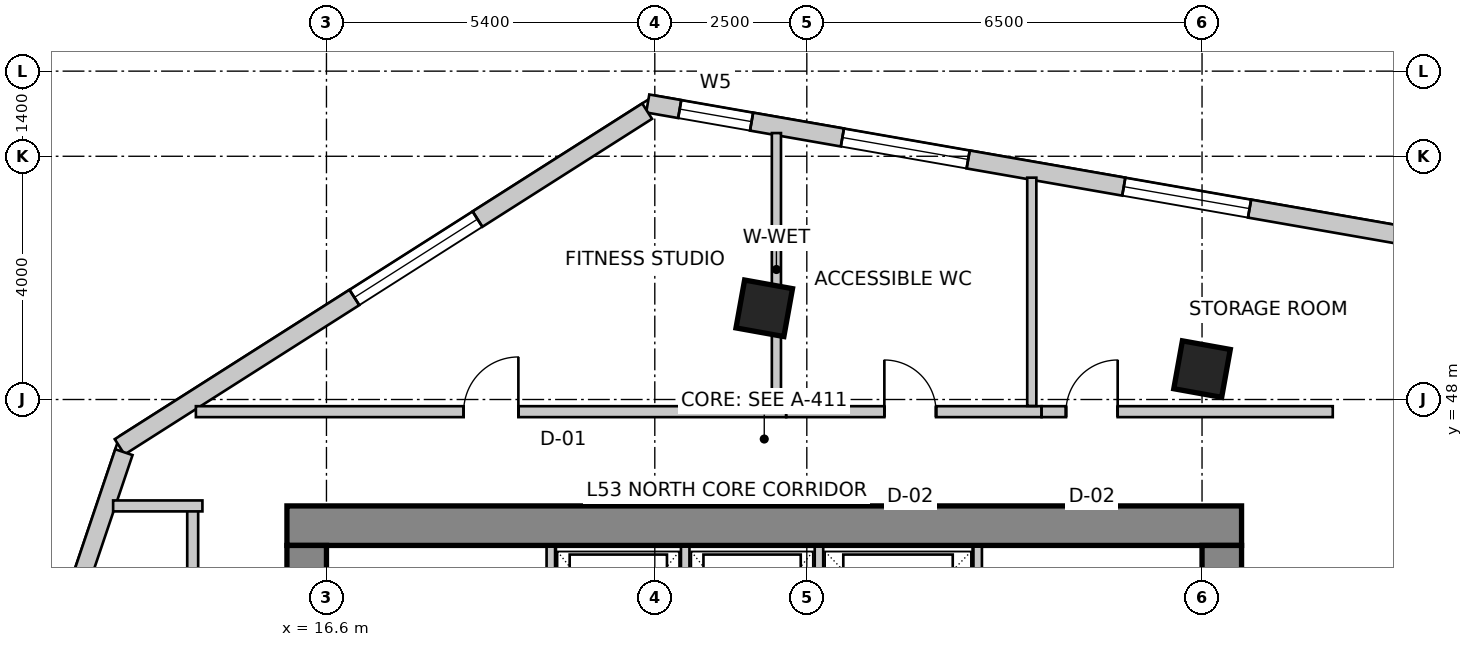
"""IFC4 building model, lengths in metres.
Left out: names, types, materials, properties, quantities, classifications, styles, units other than length and angle.
Written with IfcOpenShell. Run it as: python <this file> out.ifc"""

import sys

from ifc_helpers import new_model, si_unit, direction, frame, frame_2d, origin, origin_2d, place, context, subcontext, project, spatial, rectangle, extrude, source, transform, mapped, element, fill, save


model = new_model("IFC4")
c1 = context("Model", 3, precision=1e-05, world=origin(), true_north=direction((0.0, 1.0)))
c2 = subcontext(c1, "Body", "Model", "MODEL_VIEW")
j1 = project(units=[si_unit("LENGTHUNIT", "METRE"), si_unit("PLANEANGLEUNIT", "RADIAN")], contexts=[c1])
p1 = place(None, origin())
s1 = spatial("IfcSite", under=j1, at=p1, CompositionType="ELEMENT")
p2 = place(p1, origin())
s2 = spatial("IfcBuilding", under=s1, at=p2, CompositionType="ELEMENT")
p3 = place(p2, frame((0.0, 0.0, 211.4)))
s3 = spatial("IfcBuildingStorey", under=s2, at=p3, CompositionType="ELEMENT", Elevation=211.4)
p4 = place(p3, frame((15.95, 45.925, 0.0), z_axis=(0.0, 0.0, 1.0), x_axis=(1.0, 0.0, 0.0)))
e1 = element("IfcWall", 1, at=p4, inside=s3, PredefinedType="SHEAR", context=c2, shape_type="SweptSolid", body=[
    extrude(rectangle(XDim=15.7, YDim=0.65, at=frame_2d((7.85, 0.0))), origin(), (0.0, 0.0, 1.0), 3.5),
])
p5 = place(p3, frame((16.275, 34.2, 0.0), z_axis=(0.0, 0.0, 1.0), x_axis=(0.0, 1.0, 0.0)))
e2 = element("IfcWall", 2, at=p5, inside=s3, PredefinedType="SHEAR", context=c2, shape_type="SweptSolid", body=[
    extrude(rectangle(XDim=11.4, YDim=0.65, at=frame_2d((5.7, 0.0))), origin(), (0.0, 0.0, 1.0), 3.5),
])
m1 = source(origin(), c2, "Body", "SweptSolid", [
    extrude(rectangle(XDim=1.1, YDim=2.15, at=frame_2d((0.55, 1.075))), frame((0.0, 0.335, 0.0), z_axis=(0.0, -1.0, 0.0), x_axis=(1.0, 0.0, 0.0)), (0.0, 0.0, 1.0), 0.67),
])
p6 = place(p5, frame((7.15, 0.0, 0.0)))
e3 = element("IfcOpeningElement", 3, at=p6, cuts=e2, PredefinedType="OPENING", context=c2, shape_type="MappedRepresentation", body=[
    mapped(m1, transform((0.0, 0.0, 0.0), scale=1.0)),
])
p7 = place(p3, frame((31.325, 34.2, 0.0), z_axis=(0.0, 0.0, 1.0), x_axis=(0.0, 1.0, 0.0)))
e4 = element("IfcWall", 4, at=p7, inside=s3, PredefinedType="SHEAR", context=c2, shape_type="SweptSolid", body=[
    extrude(rectangle(XDim=11.4, YDim=0.65, at=frame_2d((5.7, 0.0))), origin(), (0.0, 0.0, 1.0), 3.5),
])
p8 = place(p7, frame((7.35, 0.0, 0.0)))
e5 = element("IfcOpeningElement", 5, at=p8, cuts=e4, PredefinedType="OPENING", context=c2, shape_type="MappedRepresentation", body=[
    mapped(m1, transform((0.0, 0.0, 0.0), scale=1.0)),
])
m2 = source(origin(), c2, "Body", "SweptSolid", [
    extrude(rectangle(XDim=0.8, YDim=0.8, at=origin_2d()), origin(), (0.0, 0.0, 1.0), 3.5),
])
for number, where, z_axis, x_axis in (
    (6, (23.8, 49.5, 0.0), (0.0, 0.0, 1.0), (0.984, -0.177, 0.0)),
    (7, (31.0, 48.5, 0.0), (0.0, 0.0, 1.0), (0.984, -0.177, 0.0)),
):
    element("IfcColumn", number, at=place(p3, frame(where, z_axis=z_axis, x_axis=x_axis)), inside=s3, PredefinedType="COLUMN", context=c2, shape_type="MappedRepresentation", body=[
        mapped(m2, transform((0.0, 0.0, 0.0), scale=1.0)),
    ])
p9 = place(p3, frame((43.561, 49.081, 0.0), z_axis=(0.0, 0.0, 1.0), x_axis=(-0.985083967494, 0.17207433564, 0.0)))
e8 = element("IfcWall", 8, at=p9, inside=s3, PredefinedType="SOLIDWALL", context=c2, shape_type="SweptSolid", body=[
    extrude(rectangle(XDim=22.006, YDim=0.3, at=frame_2d((11.003, 0.0))), origin(), (0.0, 0.0, 1.0), 3.25),
])
m3 = source(origin(), c2, "Body", "SweptSolid", [
    extrude(rectangle(XDim=2.1, YDim=2.0, at=frame_2d((1.05, 1.0))), frame((0.0, 0.16, 0.0), z_axis=(0.0, -1.0, 0.0), x_axis=(1.0, 0.0, 0.0)), (0.0, 0.0, 1.0), 0.32),
])
p10 = place(p9, frame((2.573, 0.0, 0.85)))
e9 = element("IfcOpeningElement", 9, at=p10, cuts=e8, PredefinedType="OPENING", context=c2, shape_type="MappedRepresentation", body=[
    mapped(m3, transform((0.0, 0.0, 0.0), scale=1.0)),
])
m4 = source(origin(), c2, "Body", "SweptSolid", [
    extrude(rectangle(XDim=2.4, YDim=2.2, at=frame_2d((1.2, 1.1))), frame((0.0, 0.16, 0.0), z_axis=(0.0, -1.0, 0.0), x_axis=(1.0, 0.0, 0.0)), (0.0, 0.0, 1.0), 0.32),
])
p11 = place(p9, frame((7.116, 0.0, 0.85)))
e10 = element("IfcOpeningElement", 10, at=p11, cuts=e8, PredefinedType="OPENING", context=c2, shape_type="MappedRepresentation", body=[
    mapped(m4, transform((0.0, 0.0, 0.0), scale=1.0)),
])
p12 = place(p9, frame((11.958, 0.0, 0.85)))
e11 = element("IfcOpeningElement", 11, at=p12, cuts=e8, PredefinedType="OPENING", context=c2, shape_type="MappedRepresentation", body=[
    mapped(m3, transform((0.0, 0.0, 0.0), scale=1.0)),
])
p13 = place(p9, frame((16.656, 0.0, 0.85)))
e12 = element("IfcOpeningElement", 12, at=p13, cuts=e8, PredefinedType="OPENING", context=c2, shape_type="MappedRepresentation", body=[
    mapped(m3, transform((0.0, 0.0, 0.0), scale=1.0)),
])
m5 = source(origin(), c2, "Body", "SweptSolid", [
    extrude(rectangle(XDim=1.2, YDim=1.6, at=frame_2d((0.6, 0.8))), frame((0.0, 0.16, 0.0), z_axis=(0.0, -1.0, 0.0), x_axis=(1.0, 0.0, 0.0)), (0.0, 0.0, 1.0), 0.32),
])
p14 = place(p9, frame((20.272, 0.0, 0.85)))
e13 = element("IfcOpeningElement", 13, at=p14, cuts=e8, PredefinedType="OPENING", context=c2, shape_type="MappedRepresentation", body=[
    mapped(m5, transform((0.0, 0.0, 0.0), scale=1.0)),
])
p15 = place(p3, frame((21.874, 52.742, 0.0), z_axis=(0.0, 0.0, 1.0), x_axis=(-0.84365659959, -0.536883173482, 0.0)))
e14 = element("IfcWall", 14, at=p15, inside=s3, PredefinedType="SOLIDWALL", context=c2, shape_type="SweptSolid", body=[
    extrude(rectangle(XDim=10.283, YDim=0.3, at=frame_2d((5.142, 0.0))), origin(), (0.0, 0.0, 1.0), 3.25),
])
p16 = place(p15, frame((3.307, 0.0, 0.85)))
e15 = element("IfcOpeningElement", 15, at=p16, cuts=e14, PredefinedType="OPENING", context=c2, shape_type="MappedRepresentation", body=[
    mapped(m4, transform((0.0, 0.0, 0.0), scale=1.0)),
])
p17 = place(p3, frame((13.269, 47.134, 0.0), z_axis=(0.0, 0.0, 1.0), x_axis=(-0.319920776449, -0.947444297464, 0.0)))
e16 = element("IfcWall", 16, at=p17, inside=s3, PredefinedType="SOLIDWALL", context=c2, shape_type="SweptSolid", body=[
    extrude(rectangle(XDim=16.133, YDim=0.3, at=frame_2d((8.067, 0.0))), origin(), (0.0, 0.0, 1.0), 3.25),
])
p18 = place(p17, frame((2.513, 0.0, 0.85)))
e17 = element("IfcOpeningElement", 17, at=p18, cuts=e16, PredefinedType="OPENING", context=c2, shape_type="MappedRepresentation", body=[
    mapped(m3, transform((0.0, 0.0, 0.0), scale=1.0)),
])
p19 = place(p17, frame((7.26, 0.0, 0.85)))
e18 = element("IfcOpeningElement", 18, at=p19, cuts=e16, PredefinedType="OPENING", context=c2, shape_type="MappedRepresentation", body=[
    mapped(m4, transform((0.0, 0.0, 0.0), scale=1.0)),
])
p20 = place(p17, frame((12.307, 0.0, 0.85)))
e19 = element("IfcOpeningElement", 19, at=p20, cuts=e16, PredefinedType="OPENING", context=c2, shape_type="MappedRepresentation", body=[
    mapped(m3, transform((0.0, 0.0, 0.0), scale=1.0)),
])
for number, where, z_axis, x_axis in (
    (20, (20.29, 43.28, 0.0), (0.0, 0.0, 1.0), (0.0, 1.0, 0.0)),
    (21, (27.31, 43.28, 0.0), (0.0, 0.0, 1.0), (0.0, 1.0, 0.0)),
):
    element("IfcWall", number, at=place(p3, frame(where, z_axis=z_axis, x_axis=x_axis)), inside=s3, PredefinedType="SOLIDWALL", context=c2, shape_type="SweptSolid", body=[
        extrude(rectangle(XDim=2.3, YDim=0.14, at=frame_2d((1.15, 0.0))), origin(), (0.0, 0.0, 1.0), 3.25),
    ])
for number, where, z_axis, x_axis in (
    (22, (22.5, 43.02, 0.0), (0.0, 0.0, 1.0), (0.0, 1.0, 0.0)),
    (23, (24.7, 43.02, 0.0), (0.0, 0.0, 1.0), (0.0, 1.0, 0.0)),
):
    element("IfcWall", number, at=place(p3, frame(where, z_axis=z_axis, x_axis=x_axis)), inside=s3, PredefinedType="SOLIDWALL", context=c2, shape_type="SweptSolid", body=[
        extrude(rectangle(XDim=2.56, YDim=0.14, at=frame_2d((1.28, 0.0))), origin(), (0.0, 0.0, 1.0), 3.25),
    ])
p21 = place(p3, frame((14.4, 33.644, 0.0), z_axis=(0.0, 0.0, 1.0), x_axis=(0.0, 1.0, 0.0)))
e24 = element("IfcWall", 24, at=p21, inside=s3, PredefinedType="PARTITIONING", context=c2, shape_type="SweptSolid", body=[
    extrude(rectangle(XDim=12.606, YDim=0.18, at=frame_2d((6.303, 0.0))), origin(), (0.0, 0.0, 1.0), 3.25),
])
m6 = source(origin(), c2, "Body", "SweptSolid", [
    extrude(rectangle(XDim=0.9, YDim=2.15, at=frame_2d((0.45, 1.075))), frame((0.0, 0.1, 0.0), z_axis=(0.0, -1.0, 0.0), x_axis=(1.0, 0.0, 0.0)), (0.0, 0.0, 1.0), 0.2),
])
p22 = place(p21, frame((4.399, 0.0, 0.0)))
e25 = element("IfcOpeningElement", 25, at=p22, cuts=e24, PredefinedType="OPENING", context=c2, shape_type="MappedRepresentation", body=[
    mapped(m6, transform((0.0, 0.0, 0.0), scale=1.0)),
])
p23 = place(p3, frame((14.56, 46.25, 0.0), z_axis=(0.0, 0.0, 1.0), x_axis=(-1.0, 0.0, 0.0)))
e26 = element("IfcWall", 26, at=p23, inside=s3, PredefinedType="PARTITIONING", context=c2, shape_type="SweptSolid", body=[
    extrude(rectangle(XDim=1.469, YDim=0.18, at=frame_2d((0.734, 0.0))), origin(), (0.0, 0.0, 1.0), 3.25),
])
p24 = place(p3, frame((14.453, 47.8, 0.0), z_axis=(0.0, 0.0, 1.0), x_axis=(1.0, 0.0, 0.0)))
e27 = element("IfcWall", 27, at=p24, inside=s3, PredefinedType="PARTITIONING", context=c2, shape_type="SweptSolid", body=[
    extrude(rectangle(XDim=9.707, YDim=0.18, at=frame_2d((4.854, 0.0))), origin(), (0.0, 0.0, 1.0), 2.934),
])
p25 = place(p24, frame((4.404, 0.0, 0.0)))
e28 = element("IfcOpeningElement", 28, at=p25, cuts=e27, PredefinedType="OPENING", context=c2, shape_type="MappedRepresentation", body=[
    mapped(m6, transform((0.0, 0.0, 0.0), scale=1.0)),
])
p26 = place(p3, frame((24.162, 47.8, 0.0), z_axis=(0.0, 0.0, 1.0), x_axis=(1.0, 0.0, 0.0)))
e29 = element("IfcWall", 29, at=p26, inside=s3, PredefinedType="PARTITIONING", context=c2, shape_type="SweptSolid", body=[
    extrude(rectangle(XDim=4.198, YDim=0.18, at=frame_2d((2.099, 0.0))), origin(), (0.0, 0.0, 1.0), 3.25),
])
m7 = source(origin(), c2, "Body", "SweptSolid", [
    extrude(rectangle(XDim=0.85, YDim=2.15, at=frame_2d((0.425, 1.075))), frame((0.0, 0.1, 0.0), z_axis=(0.0, -1.0, 0.0), x_axis=(1.0, 0.0, 0.0)), (0.0, 0.0, 1.0), 0.2),
])
p27 = place(p26, frame((1.613, 0.0, 0.0)))
e30 = element("IfcOpeningElement", 30, at=p27, cuts=e29, PredefinedType="OPENING", context=c2, shape_type="MappedRepresentation", body=[
    mapped(m7, transform((0.0, 0.0, 0.0), scale=1.0)),
])
p28 = place(p3, frame((28.362, 47.8, 0.0), z_axis=(0.0, 0.0, 1.0), x_axis=(1.0, 0.0, 0.0)))
e31 = element("IfcWall", 31, at=p28, inside=s3, PredefinedType="PARTITIONING", context=c2, shape_type="SweptSolid", body=[
    extrude(rectangle(XDim=4.788, YDim=0.18, at=frame_2d((2.394, 0.0))), origin(), (0.0, 0.0, 1.0), 2.822),
])
p29 = place(p28, frame((0.401, 0.0, 0.0)))
e32 = element("IfcOpeningElement", 32, at=p29, cuts=e31, PredefinedType="OPENING", context=c2, shape_type="MappedRepresentation", body=[
    mapped(m7, transform((0.0, 0.0, 0.0), scale=1.0)),
])
p30 = place(p3, frame((24.0, 52.382, 0.0), z_axis=(0.0, 0.0, 1.0), x_axis=(0.0, -1.0, 0.0)))
e33 = element("IfcWall", 33, at=p30, inside=s3, PredefinedType="PARTITIONING", context=c2, shape_type="SweptSolid", body=[
    extrude(rectangle(XDim=4.488, YDim=0.15, at=frame_2d((2.244, 0.0))), origin(), (0.0, 0.0, 1.0), 2.542),
])
p31 = place(p3, frame((28.2, 51.648, 0.0), z_axis=(0.0, 0.0, 1.0), x_axis=(0.0, -1.0, 0.0)))
e34 = element("IfcWall", 34, at=p31, inside=s3, PredefinedType="PARTITIONING", context=c2, shape_type="SweptSolid", body=[
    extrude(rectangle(XDim=3.754, YDim=0.15, at=frame_2d((1.877, 0.0))), origin(), (0.0, 0.0, 1.0), 2.542),
])
m8 = source(origin(), c2, "Body", "SweptSolid", [
    extrude(rectangle(XDim=2.1, YDim=2.0, at=frame_2d((1.05, 1.0))), frame((0.0, -0.015, 0.0), z_axis=(0.0, -1.0, 0.0), x_axis=(1.0, 0.0, 0.0)), (0.0, 0.0, 1.0), 0.06),
])
p32 = place(p12, origin())
e35 = element("IfcWindow", 35, at=p32, inside=s3, PartitioningType="SINGLE_PANEL", PredefinedType="WINDOW", context=c2, shape_type="MappedRepresentation", body=[
    mapped(m8, transform((0.0, 0.0, 0.0), scale=1.0)),
])
fill(e11, e35)
p33 = place(p13, origin())
e36 = element("IfcWindow", 36, at=p33, inside=s3, PartitioningType="SINGLE_PANEL", PredefinedType="WINDOW", context=c2, shape_type="MappedRepresentation", body=[
    mapped(m8, transform((0.0, 0.0, 0.0), scale=1.0)),
])
fill(e12, e36)
m9 = source(origin(), c2, "Body", "SweptSolid", [
    extrude(rectangle(XDim=1.2, YDim=1.6, at=frame_2d((0.6, 0.8))), frame((0.0, -0.015, 0.0), z_axis=(0.0, -1.0, 0.0), x_axis=(1.0, 0.0, 0.0)), (0.0, 0.0, 1.0), 0.06),
])
p34 = place(p14, origin())
e37 = element("IfcWindow", 37, at=p34, inside=s3, PartitioningType="SINGLE_PANEL", PredefinedType="WINDOW", context=c2, shape_type="MappedRepresentation", body=[
    mapped(m9, transform((0.0, 0.0, 0.0), scale=1.0)),
])
fill(e13, e37)
m10 = source(origin(), c2, "Body", "SweptSolid", [
    extrude(rectangle(XDim=2.4, YDim=2.2, at=frame_2d((1.2, 1.1))), frame((0.0, -0.015, 0.0), z_axis=(0.0, -1.0, 0.0), x_axis=(1.0, 0.0, 0.0)), (0.0, 0.0, 1.0), 0.06),
])
p35 = place(p16, origin())
e38 = element("IfcWindow", 38, at=p35, inside=s3, PartitioningType="SINGLE_PANEL", PredefinedType="WINDOW", context=c2, shape_type="MappedRepresentation", body=[
    mapped(m10, transform((0.0, 0.0, 0.0), scale=1.0)),
])
fill(e15, e38)
m11 = source(origin(), c2, "Body", "SweptSolid", [
    extrude(rectangle(XDim=0.9, YDim=2.15, at=frame_2d((0.45, 1.075))), frame((0.0, 0.025, 0.0), z_axis=(0.0, -1.0, 0.0), x_axis=(1.0, 0.0, 0.0)), (0.0, 0.0, 1.0), 0.05),
])
p36 = place(p25, origin())
e39 = element("IfcDoor", 39, at=p36, inside=s3, OperationType="SINGLE_SWING_RIGHT", PredefinedType="DOOR", context=c2, shape_type="MappedRepresentation", body=[
    mapped(m11, transform((0.0, 0.0, 0.0), scale=1.0)),
])
fill(e28, e39)
m12 = source(origin(), c2, "Body", "SweptSolid", [
    extrude(rectangle(XDim=0.85, YDim=2.15, at=frame_2d((0.425, 1.075))), frame((0.0, 0.025, 0.0), z_axis=(0.0, -1.0, 0.0), x_axis=(1.0, 0.0, 0.0)), (0.0, 0.0, 1.0), 0.05),
])
p37 = place(p27, origin())
e40 = element("IfcDoor", 40, at=p37, inside=s3, OperationType="SINGLE_SWING_LEFT", PredefinedType="DOOR", context=c2, shape_type="MappedRepresentation", body=[
    mapped(m12, transform((0.0, 0.0, 0.0), scale=1.0)),
])
fill(e30, e40)
p38 = place(p29, origin())
e41 = element("IfcDoor", 41, at=p38, inside=s3, OperationType="SINGLE_SWING_RIGHT", PredefinedType="DOOR", context=c2, shape_type="MappedRepresentation", body=[
    mapped(m12, transform((0.0, 0.0, 0.0), scale=1.0)),
])
fill(e32, e41)
save(model, sys.argv[1])
